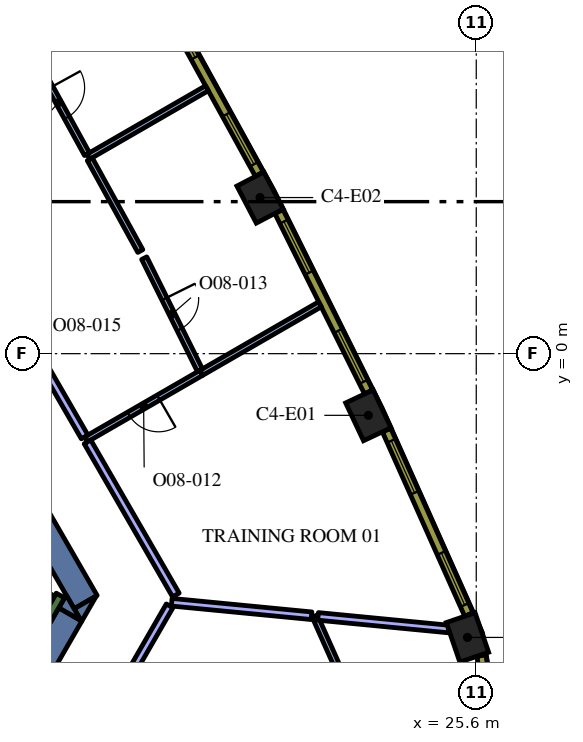
"""IFC4 building model, lengths in metres.
Left out: names, types, materials, properties, quantities, classifications, styles, units other than length and angle.
Written with IfcOpenShell. Run it as: python <this file> out.ifc"""

import sys

from ifc_helpers import new_model, si_unit, direction, frame, frame_2d, origin, origin_2d, place, context, subcontext, project, spatial, polyline, rectangle, outline, extrude, element, fill, save


model = new_model("IFC4")
c1 = context("Model", 3, precision=1e-05, world=origin(), true_north=direction((0.0, 1.0)))
c2 = subcontext(c1, "Body", "Model", "MODEL_VIEW")
j1 = project(units=[si_unit("LENGTHUNIT", "METRE"), si_unit("PLANEANGLEUNIT", "RADIAN")], contexts=[c1])
p1 = place(None, origin())
s1 = spatial("IfcSite", under=j1, at=p1, CompositionType="ELEMENT")
p2 = place(p1, origin())
s2 = spatial("IfcBuilding", under=s1, at=p2, CompositionType="ELEMENT")
p3 = place(p2, frame((0.0, 0.0, 235.2)))
s3 = spatial("IfcBuildingStorey", under=s2, at=p3, CompositionType="ELEMENT", Elevation=235.2)
for number, where, z_axis, x_axis in (
    (1, (25.369, -7.466, 0.0), (0.0, 0.0, 1.0), (-0.324, 0.946, 0.0)),
    (2, (22.76, -1.623, 0.0), (0.0, 0.0, 1.0), (-0.426, 0.905, 0.0)),
    (3, (19.912, 4.108, 0.0), (0.0, 0.0, 1.0), (-0.464, 0.886, 0.0)),
):
    element("IfcColumn", number, at=place(p3, frame(where, z_axis=z_axis, x_axis=x_axis)), inside=s3, PredefinedType="COLUMN", context=c2, shape_type="SweptSolid", body=[
        extrude(rectangle(XDim=1.1, YDim=0.8, at=origin_2d()), origin(), (0.0, 0.0, 1.0), 4.2),
    ])
p4 = place(p3, frame((9.085, 4.264, 0.0), z_axis=(0.0, 0.0, 1.0), x_axis=(0.499998082512, -0.866026510844, 0.0)))
e4 = element("IfcWall", 4, at=p4, inside=s3, PredefinedType="SOLIDWALL", context=c2, shape_type="SweptSolid", body=[
    extrude(rectangle(XDim=12.472, YDim=0.7, at=frame_2d((6.236, 0.0))), origin(), (0.0, 0.0, 1.0), 4.2),
])
p5 = place(p3, origin())
e5 = element("IfcWall", 5, at=p5, inside=s3, PredefinedType="SOLIDWALL", context=c2, shape_type="SweptSolid", body=[
    extrude(outline(polyline([(15.213, -7.05), (15.019, -6.714), (15.601, -6.378), (15.213, -7.05)])), origin(), (0.0, 0.0, 1.0), 4.2),
])
p6 = place(p3, frame((13.003, -10.179, 0.0), z_axis=(0.0, 0.0, 1.0), x_axis=(0.499972675833, 0.866041178825, 0.0)))
e6 = element("IfcWall", 6, at=p6, inside=s3, PredefinedType="SOLIDWALL", context=c2, shape_type="SweptSolid", body=[
    extrude(rectangle(XDim=3.829, YDim=0.7, at=frame_2d((1.915, 0.0))), origin(), (0.0, 0.0, 1.0), 4.2),
])
e7 = element("IfcWall", 7, at=p5, inside=s3, PredefinedType="SOLIDWALL", context=c2, shape_type="SweptSolid", body=[
    extrude(outline(polyline([(14.809, -6.35), (15.197, -7.022), (14.615, -6.686), (14.809, -6.35)])), origin(), (0.0, 0.0, 1.0), 4.2),
])
p7 = place(p3, frame((12.84, -9.511, 0.0), z_axis=(0.0, 0.0, 1.0), x_axis=(0.500048121057, 0.865997619297, 0.0)))
e8 = element("IfcWall", 8, at=p7, inside=s3, PredefinedType="SOLIDWALL", context=c2, shape_type="SweptSolid", body=[
    extrude(rectangle(XDim=3.634, YDim=0.25, at=frame_2d((1.817, 0.0))), origin(), (0.0, 0.0, 1.0), 4.2),
])
p8 = place(p3, frame((8.334, -2.964, 0.0), z_axis=(0.0, 0.0, 1.0), x_axis=(0.866016039709, -0.500016218704, 0.0)))
e9 = element("IfcWall", 9, at=p8, inside=s3, PredefinedType="SOLIDWALL", context=c2, shape_type="SweptSolid", body=[
    extrude(rectangle(XDim=7.05, YDim=0.25, at=frame_2d((3.525, 0.0))), origin(), (0.0, 0.0, 1.0), 4.2),
])
p9 = place(p3, frame((21.963, -8.276, 0.0), z_axis=(0.0, 0.0, 1.0), x_axis=(-0.407510458183, 0.913200540118, 0.0)))
e10 = element("IfcWall", 10, at=p9, inside=s3, PredefinedType="PARTITIONING", context=c2, shape_type="SweptSolid", body=[
    extrude(rectangle(XDim=1.502, YDim=0.15, at=frame_2d((0.751, 0.0))), origin(), (0.0, 0.0, 1.0), 3.45),
])
p10 = place(p3, frame((21.437, -6.913, 0.0), z_axis=(0.0, 0.0, 1.0), x_axis=(0.995357015301, -0.096251816042, 0.0)))
e11 = element("IfcWall", 11, at=p10, inside=s3, PredefinedType="PARTITIONING", context=c2, shape_type="SweptSolid", body=[
    extrude(rectangle(XDim=3.45, YDim=0.2, at=frame_2d((1.725, 0.0))), origin(), (0.0, 0.0, 1.0), 3.45),
])
p11 = place(p3, frame((17.586, -6.54, 0.0), z_axis=(0.0, 0.0, 1.0), x_axis=(0.995358181524, -0.096239755158, 0.0)))
e12 = element("IfcWall", 12, at=p11, inside=s3, PredefinedType="PARTITIONING", context=c2, shape_type="SweptSolid", body=[
    extrude(rectangle(XDim=3.696, YDim=0.2, at=frame_2d((1.848, 0.0))), origin(), (0.0, 0.0, 1.0), 3.45),
])
p12 = place(p3, frame((14.362, -12.124, 0.0), z_axis=(0.0, 0.0, 1.0), x_axis=(0.500017005442, 0.866015585465, 0.0)))
e13 = element("IfcWall", 13, at=p12, inside=s3, PredefinedType="PARTITIONING", context=c2, shape_type="SweptSolid", body=[
    extrude(rectangle(XDim=6.338, YDim=0.2, at=frame_2d((3.169, 0.0))), origin(), (0.0, 0.0, 1.0), 3.45),
])
p13 = place(p3, frame((18.36, -0.508, 0.0), z_axis=(0.0, 0.0, 1.0), x_axis=(0.866033589339, 0.499985821935, 0.0)))
e14 = element("IfcWall", 14, at=p13, inside=s3, PredefinedType="PARTITIONING", context=c2, shape_type="SweptSolid", body=[
    extrude(rectangle(XDim=3.611, YDim=0.15, at=frame_2d((1.805, 0.0))), origin(), (0.0, 0.0, 1.0), 3.45),
])
p14 = place(p3, frame((18.367, -0.504, 0.0), z_axis=(0.0, 0.0, 1.0), x_axis=(-0.866056812483, -0.499945594592, 0.0)))
e15 = element("IfcWall", 15, at=p14, inside=s3, PredefinedType="PARTITIONING", context=c2, shape_type="SweptSolid", body=[
    extrude(rectangle(XDim=3.504, YDim=0.15, at=frame_2d((1.752, 0.0))), origin(), (0.0, 0.0, 1.0), 3.45),
])
p15 = place(p14, frame((1.304, 0.0, 0.0)))
e16 = element("IfcOpeningElement", 16, at=p15, cuts=e15, PredefinedType="OPENING", context=c2, shape_type="SweptSolid", body=[
    extrude(rectangle(XDim=0.9, YDim=2.1, at=frame_2d((0.45, 1.05))), frame((0.0, 0.085, 0.0), z_axis=(0.0, -1.0, 0.0), x_axis=(1.0, 0.0, 0.0)), (0.0, 0.0, 1.0), 0.17),
])
p16 = place(p3, frame((17.696, -6.35, 0.0), z_axis=(0.0, 0.0, 1.0), x_axis=(-0.499976825411, 0.866038783226, 0.0)))
e17 = element("IfcWall", 17, at=p16, inside=s3, PredefinedType="PARTITIONING", context=c2, shape_type="SweptSolid", body=[
    extrude(rectangle(XDim=4.653, YDim=0.2, at=frame_2d((2.326, 0.0))), origin(), (0.0, 0.0, 1.0), 3.45),
])
p17 = place(p3, frame((15.394, 5.183, 0.0), z_axis=(0.0, 0.0, 1.0), x_axis=(0.866039935929, 0.499974828743, 0.0)))
e18 = element("IfcWall", 18, at=p17, inside=s3, PredefinedType="PARTITIONING", context=c2, shape_type="SweptSolid", body=[
    extrude(rectangle(XDim=3.601, YDim=0.15, at=frame_2d((1.8, 0.0))), origin(), (0.0, 0.0, 1.0), 3.45),
])
p18 = place(p3, frame((16.863, 2.513, 0.0), z_axis=(0.0, 0.0, 1.0), x_axis=(0.445197589821, -0.895432357031, 0.0)))
e19 = element("IfcWall", 19, at=p18, inside=s3, PredefinedType="PARTITIONING", context=c2, shape_type="SweptSolid", body=[
    extrude(rectangle(XDim=3.296, YDim=0.15, at=frame_2d((1.648, 0.0))), origin(), (0.0, 0.0, 1.0), 3.45),
])
p19 = place(p18, frame((1.196, 0.0, 0.0)))
e20 = element("IfcOpeningElement", 20, at=p19, cuts=e19, PredefinedType="OPENING", context=c2, shape_type="SweptSolid", body=[
    extrude(rectangle(XDim=0.9, YDim=2.1, at=frame_2d((0.45, 1.05))), frame((0.0, 0.085, 0.0), z_axis=(0.0, -1.0, 0.0), x_axis=(1.0, 0.0, 0.0)), (0.0, 0.0, 1.0), 0.17),
])
p20 = place(p3, frame((16.76, 2.7, 0.0), z_axis=(0.0, 0.0, 1.0), x_axis=(-0.481888167687, 0.876232728128, 0.0)))
e21 = element("IfcWall", 21, at=p20, inside=s3, PredefinedType="PARTITIONING", context=c2, shape_type="SweptSolid", body=[
    extrude(rectangle(XDim=2.758, YDim=0.15, at=frame_2d((1.379, 0.0))), origin(), (0.0, 0.0, 1.0), 3.45),
])
p21 = place(p3, frame((13.848, 7.995, 0.0), z_axis=(0.0, 0.0, 1.0), x_axis=(0.481894826099, -0.876229066272, 0.0)))
e22 = element("IfcWall", 22, at=p21, inside=s3, PredefinedType="PARTITIONING", context=c2, shape_type="SweptSolid", body=[
    extrude(rectangle(XDim=3.134, YDim=0.15, at=frame_2d((1.567, 0.0))), origin(), (0.0, 0.0, 1.0), 3.45),
])
p22 = place(p21, frame((1.134, 0.0, 0.0)))
e23 = element("IfcOpeningElement", 23, at=p22, cuts=e22, PredefinedType="OPENING", context=c2, shape_type="SweptSolid", body=[
    extrude(rectangle(XDim=0.9, YDim=2.1, at=frame_2d((0.45, 1.05))), frame((0.0, 0.085, 0.0), z_axis=(0.0, -1.0, 0.0), x_axis=(1.0, 0.0, 0.0)), (0.0, 0.0, 1.0), 0.17),
])
p23 = place(p3, frame((15.295, -2.191, 0.0), z_axis=(0.0, 0.0, 1.0), x_axis=(-0.500039923732, 0.86600235258, 0.0)))
e24 = element("IfcWall", 24, at=p23, inside=s3, PredefinedType="PARTITIONING", context=c2, shape_type="SweptSolid", body=[
    extrude(rectangle(XDim=5.015, YDim=0.2, at=frame_2d((2.507, 0.0))), origin(), (0.0, 0.0, 1.0), 3.45),
])
p24 = place(p23, frame((2.0, 0.0, 0.0)))
e25 = element("IfcOpeningElement", 25, at=p24, cuts=e24, PredefinedType="OPENING", context=c2, shape_type="SweptSolid", body=[
    extrude(rectangle(XDim=1.0, YDim=2.1, at=frame_2d((0.5, 1.05))), frame((0.0, 0.11, 0.0), z_axis=(0.0, -1.0, 0.0), x_axis=(1.0, 0.0, 0.0)), (0.0, 0.0, 1.0), 0.22),
])
p25 = place(p3, frame((26.172, -10.517, 0.0), z_axis=(0.0, 0.0, 1.0), x_axis=(-0.167660055546, 0.985844869021, 0.0)))
e26 = element("IfcWall", 26, at=p25, inside=s3, PredefinedType="SOLIDWALL", context=c2, shape_type="SweptSolid", body=[
    extrude(rectangle(XDim=2.609, YDim=0.24, at=frame_2d((1.305, 0.0))), origin(), (0.0, 0.0, 1.0), 3.95),
])
p26 = place(p25, frame((0.805, 0.0, 0.9)))
e27 = element("IfcOpeningElement", 27, at=p26, cuts=e26, PredefinedType="OPENING", context=c2, shape_type="SweptSolid", body=[
    extrude(rectangle(XDim=1.0, YDim=2.55, at=frame_2d((0.5, 1.275))), frame((0.0, 0.13, 0.0), z_axis=(0.0, -1.0, 0.0), x_axis=(1.0, 0.0, 0.0)), (0.0, 0.0, 1.0), 0.26),
])
p27 = place(p3, frame((25.405, -6.861, 0.0), z_axis=(0.0, 0.0, 1.0), x_axis=(-0.407579651789, 0.913169659728, 0.0)))
e28 = element("IfcWall", 28, at=p27, inside=s3, PredefinedType="SOLIDWALL", context=c2, shape_type="SweptSolid", body=[
    extrude(rectangle(XDim=5.311, YDim=0.24, at=frame_2d((2.655, 0.0))), origin(), (0.0, 0.0, 1.0), 3.95),
])
p28 = place(p27, frame((0.271, 0.0, 0.9)))
e29 = element("IfcOpeningElement", 29, at=p28, cuts=e28, PredefinedType="OPENING", context=c2, shape_type="SweptSolid", body=[
    extrude(rectangle(XDim=1.5, YDim=2.55, at=frame_2d((0.75, 1.275))), frame((0.0, 0.13, 0.0), z_axis=(0.0, -1.0, 0.0), x_axis=(1.0, 0.0, 0.0)), (0.0, 0.0, 1.0), 0.26),
])
p29 = place(p27, frame((3.504, 0.0, 0.9)))
e30 = element("IfcOpeningElement", 30, at=p29, cuts=e28, PredefinedType="OPENING", context=c2, shape_type="SweptSolid", body=[
    extrude(rectangle(XDim=1.5, YDim=2.55, at=frame_2d((0.75, 1.275))), frame((0.0, 0.13, 0.0), z_axis=(0.0, -1.0, 0.0), x_axis=(1.0, 0.0, 0.0)), (0.0, 0.0, 1.0), 0.26),
])
p30 = place(p3, frame((22.766, -1.005, 0.0), z_axis=(0.0, 0.0, 1.0), x_axis=(-0.445129582031, 0.895466166419, 0.0)))
e31 = element("IfcWall", 31, at=p30, inside=s3, PredefinedType="SOLIDWALL", context=c2, shape_type="SweptSolid", body=[
    extrude(rectangle(XDim=5.298, YDim=0.24, at=frame_2d((2.649, 0.0))), origin(), (0.0, 0.0, 1.0), 3.95),
])
p31 = place(p30, frame((0.295, 0.0, 0.9)))
e32 = element("IfcOpeningElement", 32, at=p31, cuts=e31, PredefinedType="OPENING", context=c2, shape_type="SweptSolid", body=[
    extrude(rectangle(XDim=1.5, YDim=2.55, at=frame_2d((0.75, 1.275))), frame((0.0, 0.13, 0.0), z_axis=(0.0, -1.0, 0.0), x_axis=(1.0, 0.0, 0.0)), (0.0, 0.0, 1.0), 0.26),
])
p32 = place(p30, frame((3.504, 0.0, 0.9)))
e33 = element("IfcOpeningElement", 33, at=p32, cuts=e31, PredefinedType="OPENING", context=c2, shape_type="SweptSolid", body=[
    extrude(rectangle(XDim=1.5, YDim=2.55, at=frame_2d((0.75, 1.275))), frame((0.0, 0.13, 0.0), z_axis=(0.0, -1.0, 0.0), x_axis=(1.0, 0.0, 0.0)), (0.0, 0.0, 1.0), 0.26),
])
p33 = place(p3, frame((19.892, 4.725, 0.0), z_axis=(0.0, 0.0, 1.0), x_axis=(-0.481925825015, 0.876212017256, 0.0)))
e34 = element("IfcWall", 34, at=p33, inside=s3, PredefinedType="SOLIDWALL", context=c2, shape_type="SweptSolid", body=[
    extrude(rectangle(XDim=5.299, YDim=0.24, at=frame_2d((2.649, 0.0))), origin(), (0.0, 0.0, 1.0), 3.95),
])
p34 = place(p33, frame((0.295, 0.0, 0.9)))
e35 = element("IfcOpeningElement", 35, at=p34, cuts=e34, PredefinedType="OPENING", context=c2, shape_type="SweptSolid", body=[
    extrude(rectangle(XDim=1.5, YDim=2.55, at=frame_2d((0.75, 1.275))), frame((0.0, 0.13, 0.0), z_axis=(0.0, -1.0, 0.0), x_axis=(1.0, 0.0, 0.0)), (0.0, 0.0, 1.0), 0.26),
])
p35 = place(p33, frame((3.504, 0.0, 0.9)))
e36 = element("IfcOpeningElement", 36, at=p35, cuts=e34, PredefinedType="OPENING", context=c2, shape_type="SweptSolid", body=[
    extrude(rectangle(XDim=1.5, YDim=2.55, at=frame_2d((0.75, 1.275))), frame((0.0, 0.13, 0.0), z_axis=(0.0, -1.0, 0.0), x_axis=(1.0, 0.0, 0.0)), (0.0, 0.0, 1.0), 0.26),
])
p36 = place(p15, origin())
e37 = element("IfcDoor", 37, at=p36, inside=s3, OperationType="SINGLE_SWING_RIGHT", PredefinedType="DOOR", context=c2, shape_type="SweptSolid", body=[
    extrude(rectangle(XDim=0.9, YDim=2.1, at=frame_2d((0.45, 1.05))), frame((0.0, 0.025, 0.0), z_axis=(0.0, -1.0, 0.0), x_axis=(1.0, 0.0, 0.0)), (0.0, 0.0, 1.0), 0.05),
])
fill(e16, e37)
p37 = place(p19, origin())
e38 = element("IfcDoor", 38, at=p37, inside=s3, OperationType="SINGLE_SWING_LEFT", PredefinedType="DOOR", context=c2, shape_type="SweptSolid", body=[
    extrude(rectangle(XDim=0.9, YDim=2.1, at=frame_2d((0.45, 1.05))), frame((0.0, 0.025, 0.0), z_axis=(0.0, -1.0, 0.0), x_axis=(1.0, 0.0, 0.0)), (0.0, 0.0, 1.0), 0.05),
])
fill(e20, e38)
p38 = place(p22, origin())
e39 = element("IfcDoor", 39, at=p38, inside=s3, OperationType="SINGLE_SWING_RIGHT", PredefinedType="DOOR", context=c2, shape_type="SweptSolid", body=[
    extrude(rectangle(XDim=0.9, YDim=2.1, at=frame_2d((0.45, 1.05))), frame((0.0, 0.025, 0.0), z_axis=(0.0, -1.0, 0.0), x_axis=(1.0, 0.0, 0.0)), (0.0, 0.0, 1.0), 0.05),
])
fill(e23, e39)
p39 = place(p28, origin())
e40 = element("IfcWindow", 40, at=p39, inside=s3, PartitioningType="SINGLE_PANEL", PredefinedType="WINDOW", context=c2, shape_type="SweptSolid", body=[
    extrude(rectangle(XDim=1.5, YDim=2.55, at=frame_2d((0.75, 1.275))), frame((0.0, 0.04, 0.0), z_axis=(0.0, -1.0, 0.0), x_axis=(1.0, 0.0, 0.0)), (0.0, 0.0, 1.0), 0.06),
])
fill(e29, e40)
p40 = place(p29, origin())
e41 = element("IfcWindow", 41, at=p40, inside=s3, PartitioningType="SINGLE_PANEL", PredefinedType="WINDOW", context=c2, shape_type="SweptSolid", body=[
    extrude(rectangle(XDim=1.5, YDim=2.55, at=frame_2d((0.75, 1.275))), frame((0.0, 0.04, 0.0), z_axis=(0.0, -1.0, 0.0), x_axis=(1.0, 0.0, 0.0)), (0.0, 0.0, 1.0), 0.06),
])
fill(e30, e41)
p41 = place(p31, origin())
e42 = element("IfcWindow", 42, at=p41, inside=s3, PartitioningType="SINGLE_PANEL", PredefinedType="WINDOW", context=c2, shape_type="SweptSolid", body=[
    extrude(rectangle(XDim=1.5, YDim=2.55, at=frame_2d((0.75, 1.275))), frame((0.0, 0.04, 0.0), z_axis=(0.0, -1.0, 0.0), x_axis=(1.0, 0.0, 0.0)), (0.0, 0.0, 1.0), 0.06),
])
fill(e32, e42)
p42 = place(p32, origin())
e43 = element("IfcWindow", 43, at=p42, inside=s3, PartitioningType="SINGLE_PANEL", PredefinedType="WINDOW", context=c2, shape_type="SweptSolid", body=[
    extrude(rectangle(XDim=1.5, YDim=2.55, at=frame_2d((0.75, 1.275))), frame((0.0, 0.04, 0.0), z_axis=(0.0, -1.0, 0.0), x_axis=(1.0, 0.0, 0.0)), (0.0, 0.0, 1.0), 0.06),
])
fill(e33, e43)
p43 = place(p34, origin())
e44 = element("IfcWindow", 44, at=p43, inside=s3, PartitioningType="SINGLE_PANEL", PredefinedType="WINDOW", context=c2, shape_type="SweptSolid", body=[
    extrude(rectangle(XDim=1.5, YDim=2.55, at=frame_2d((0.75, 1.275))), frame((0.0, 0.04, 0.0), z_axis=(0.0, -1.0, 0.0), x_axis=(1.0, 0.0, 0.0)), (0.0, 0.0, 1.0), 0.06),
])
fill(e35, e44)
p44 = place(p35, origin())
e45 = element("IfcWindow", 45, at=p44, inside=s3, PartitioningType="SINGLE_PANEL", PredefinedType="WINDOW", context=c2, shape_type="SweptSolid", body=[
    extrude(rectangle(XDim=1.5, YDim=2.55, at=frame_2d((0.75, 1.275))), frame((0.0, 0.04, 0.0), z_axis=(0.0, -1.0, 0.0), x_axis=(1.0, 0.0, 0.0)), (0.0, 0.0, 1.0), 0.06),
])
fill(e36, e45)
save(model, sys.argv[1])
